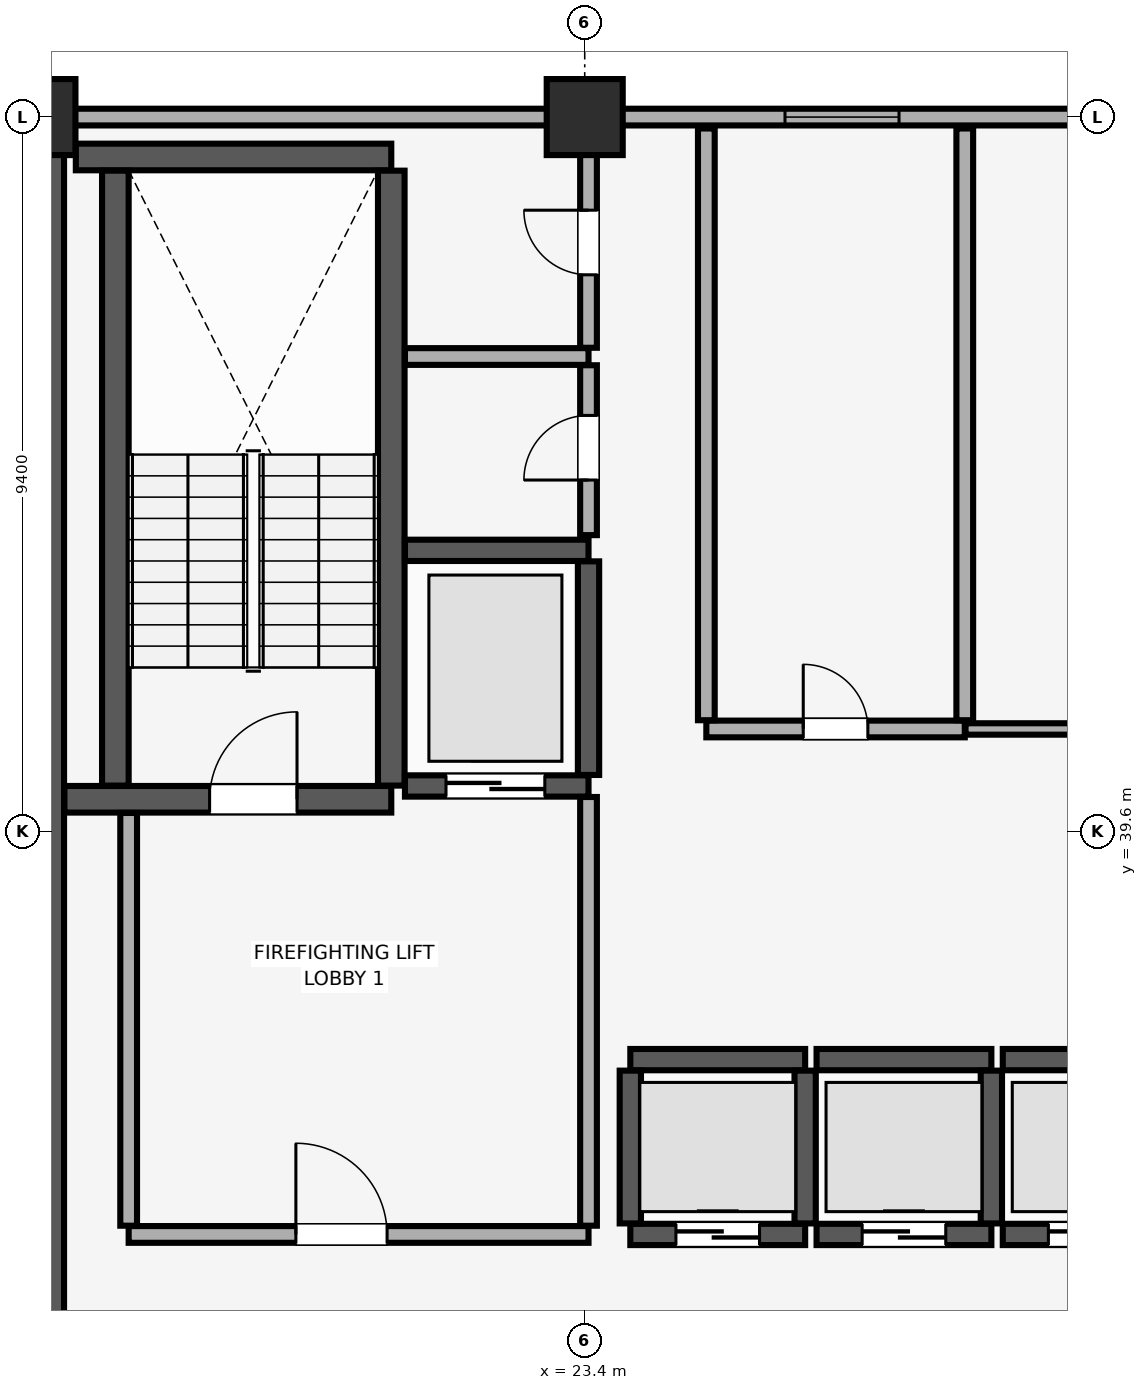
"""IFC4 building model, lengths in metres.
Left out: names, types, materials, properties, quantities, classifications, styles, units other than length and angle.
Written with IfcOpenShell. Run it as: python <this file> out.ifc"""

import sys

from ifc_helpers import new_model, si_unit, direction, frame, frame_2d, origin, origin_2d, place, context, subcontext, project, spatial, rectangle, extrude, element, fill, save


model = new_model("IFC4")
c1 = context("Model", 3, precision=1e-05, world=origin(), true_north=direction((0.0, 1.0)))
c2 = subcontext(c1, "Body", "Model", "MODEL_VIEW")
j1 = project(units=[si_unit("LENGTHUNIT", "METRE"), si_unit("PLANEANGLEUNIT", "RADIAN")], contexts=[c1])
p1 = place(None, origin())
s1 = spatial("IfcSite", under=j1, at=p1, CompositionType="ELEMENT")
p2 = place(p1, origin())
s2 = spatial("IfcBuilding", under=s1, at=p2, CompositionType="ELEMENT")
p3 = place(p2, frame((0.0, 0.0, 276.55)))
s3 = spatial("IfcBuildingStorey", under=s2, at=p3, CompositionType="ELEMENT", Elevation=276.55)
for number, where, z_axis, x_axis in (
    (1, (16.2, 49.0, 0.0), (0.0, 0.0, 1.0), (1.0, 0.0, 0.0)),
    (2, (23.4, 49.0, 0.0), (0.0, 0.0, 1.0), (1.0, 0.0, 0.0)),
):
    element("IfcColumn", number, at=place(p3, frame(where, z_axis=z_axis, x_axis=x_axis)), inside=s3, PredefinedType="COLUMN", context=c2, shape_type="SweptSolid", body=[
        extrude(rectangle(XDim=1.0, YDim=1.0, at=origin_2d()), origin(), (0.0, 0.0, 1.0), 3.6),
    ])
p4 = place(p3, frame((74.2, 49.0, 0.0), z_axis=(0.0, 0.0, 1.0), x_axis=(-1.0, 0.0, 0.0)))
e3 = element("IfcWall", 3, at=p4, inside=s3, PredefinedType="SOLIDWALL", context=c2, shape_type="SweptSolid", body=[
    extrude(rectangle(XDim=64.4, YDim=0.22, at=frame_2d((32.2, 0.0))), origin(), (0.0, 0.0, 1.0), 2.8),
])
p5 = place(p4, frame((59.815, 0.0, 0.85)))
e4 = element("IfcOpeningElement", 4, at=p5, cuts=e3, PredefinedType="OPENING", context=c2, shape_type="SweptSolid", body=[
    extrude(rectangle(XDim=3.0, YDim=1.5, at=frame_2d((1.5, 0.75))), frame((0.0, 0.12, 0.0), z_axis=(0.0, -1.0, 0.0), x_axis=(1.0, 0.0, 0.0)), (0.0, 0.0, 1.0), 0.24),
])
p6 = place(p4, frame((1.585, 0.0, 0.85)))
e5 = element("IfcOpeningElement", 5, at=p6, cuts=e3, PredefinedType="OPENING", context=c2, shape_type="SweptSolid", body=[
    extrude(rectangle(XDim=3.0, YDim=1.5, at=frame_2d((1.5, 0.75))), frame((0.0, 0.12, 0.0), z_axis=(0.0, -1.0, 0.0), x_axis=(1.0, 0.0, 0.0)), (0.0, 0.0, 1.0), 0.24),
])
p7 = place(p4, frame((46.665, 0.0, 0.9)))
e6 = element("IfcOpeningElement", 6, at=p7, cuts=e3, PredefinedType="OPENING", context=c2, shape_type="SweptSolid", body=[
    extrude(rectangle(XDim=1.5, YDim=1.4, at=frame_2d((0.75, 0.7))), frame((0.0, 0.12, 0.0), z_axis=(0.0, -1.0, 0.0), x_axis=(1.0, 0.0, 0.0)), (0.0, 0.0, 1.0), 0.24),
])
p8 = place(p4, frame((38.85, 0.0, 0.9)))
e7 = element("IfcOpeningElement", 7, at=p8, cuts=e3, PredefinedType="OPENING", context=c2, shape_type="SweptSolid", body=[
    extrude(rectangle(XDim=3.6, YDim=1.5, at=frame_2d((1.8, 0.75))), frame((0.0, 0.12, 0.0), z_axis=(0.0, -1.0, 0.0), x_axis=(1.0, 0.0, 0.0)), (0.0, 0.0, 1.0), 0.24),
])
p9 = place(p4, frame((25.45, 0.0, 0.9)))
e8 = element("IfcOpeningElement", 8, at=p9, cuts=e3, PredefinedType="OPENING", context=c2, shape_type="SweptSolid", body=[
    extrude(rectangle(XDim=1.5, YDim=1.4, at=frame_2d((0.75, 0.7))), frame((0.0, 0.12, 0.0), z_axis=(0.0, -1.0, 0.0), x_axis=(1.0, 0.0, 0.0)), (0.0, 0.0, 1.0), 0.24),
])
p10 = place(p4, frame((21.8, 0.0, 0.9)))
e9 = element("IfcOpeningElement", 9, at=p10, cuts=e3, PredefinedType="OPENING", context=c2, shape_type="SweptSolid", body=[
    extrude(rectangle(XDim=2.4, YDim=1.5, at=frame_2d((1.2, 0.75))), frame((0.0, 0.12, 0.0), z_axis=(0.0, -1.0, 0.0), x_axis=(1.0, 0.0, 0.0)), (0.0, 0.0, 1.0), 0.24),
])
p11 = place(p4, frame((17.435, 0.0, 0.9)))
e10 = element("IfcOpeningElement", 10, at=p11, cuts=e3, PredefinedType="OPENING", context=c2, shape_type="SweptSolid", body=[
    extrude(rectangle(XDim=2.4, YDim=1.5, at=frame_2d((1.2, 0.75))), frame((0.0, 0.12, 0.0), z_axis=(0.0, -1.0, 0.0), x_axis=(1.0, 0.0, 0.0)), (0.0, 0.0, 1.0), 0.24),
])
p12 = place(p3, frame((16.2, 29.4, 0.0), z_axis=(0.0, 0.0, 1.0), x_axis=(0.0, 1.0, 0.0)))
e11 = element("IfcWall", 11, at=p12, inside=s3, PredefinedType="SHEAR", context=c2, shape_type="SweptSolid", body=[
    extrude(rectangle(XDim=19.2, YDim=0.7, at=frame_2d((9.6, 0.0))), origin(), (0.0, 0.0, 1.0), 3.6),
])
p13 = place(p3, frame((16.555, 40.025, 0.0), z_axis=(0.0, 0.0, 1.0), x_axis=(1.0, 0.0, 0.0)))
e12 = element("IfcWall", 12, at=p13, inside=s3, PredefinedType="SHEAR", context=c2, shape_type="SweptSolid", body=[
    extrude(rectangle(XDim=4.3, YDim=0.35, at=frame_2d((2.15, 0.0))), origin(), (0.0, 0.0, 1.0), 3.6),
])
p14 = place(p13, frame((1.91, 0.0, 0.0)))
e13 = element("IfcOpeningElement", 13, at=p14, cuts=e12, PredefinedType="OPENING", context=c2, shape_type="SweptSolid", body=[
    extrude(rectangle(XDim=1.15, YDim=2.15, at=frame_2d((0.575, 1.075))), frame((0.0, 0.185, 0.0), z_axis=(0.0, -1.0, 0.0), x_axis=(1.0, 0.0, 0.0)), (0.0, 0.0, 1.0), 0.37),
])
p15 = place(p3, frame((16.705, 48.475, 0.0), z_axis=(0.0, 0.0, 1.0), x_axis=(1.0, 0.0, 0.0)))
e14 = element("IfcWall", 14, at=p15, inside=s3, PredefinedType="SHEAR", context=c2, shape_type="SweptSolid", body=[
    extrude(rectangle(XDim=4.15, YDim=0.35, at=frame_2d((2.075, 0.0))), origin(), (0.0, 0.0, 1.0), 3.6),
])
for number, where, z_axis, x_axis in (
    (15, (17.225, 40.205, 0.0), (0.0, 0.0, 1.0), (0.0, 1.0, 0.0)),
    (16, (20.855, 40.205, 0.0), (0.0, 0.0, 1.0), (0.0, 1.0, 0.0)),
):
    element("IfcWall", number, at=place(p3, frame(where, z_axis=z_axis, x_axis=x_axis)), inside=s3, PredefinedType="SHEAR", context=c2, shape_type="SweptSolid", body=[
        extrude(rectangle(XDim=8.09, YDim=0.35, at=frame_2d((4.045, 0.0))), origin(), (0.0, 0.0, 1.0), 3.6),
    ])
p16 = place(p3, frame((24.0, 34.3, 0.0), z_axis=(0.0, 0.0, 1.0), x_axis=(1.0, 0.0, 0.0)))
e17 = element("IfcWall", 17, at=p16, inside=s3, PredefinedType="SHEAR", context=c2, shape_type="SweptSolid", body=[
    extrude(rectangle(XDim=2.3, YDim=0.28, at=frame_2d((1.15, 0.0))), origin(), (0.0, 0.0, 1.0), 3.6),
])
p17 = place(p16, frame((0.6, 0.0, 0.0)))
e18 = element("IfcOpeningElement", 18, at=p17, cuts=e17, PredefinedType="OPENING", context=c2, shape_type="SweptSolid", body=[
    extrude(rectangle(XDim=1.1, YDim=2.2, at=frame_2d((0.55, 1.1))), frame((0.0, 0.15, 0.0), z_axis=(0.0, -1.0, 0.0), x_axis=(1.0, 0.0, 0.0)), (0.0, 0.0, 1.0), 0.3),
])
p18 = place(p3, frame((24.0, 36.6, 0.0), z_axis=(0.0, 0.0, 1.0), x_axis=(1.0, 0.0, 0.0)))
e19 = element("IfcWall", 19, at=p18, inside=s3, PredefinedType="SHEAR", context=c2, shape_type="SweptSolid", body=[
    extrude(rectangle(XDim=2.3, YDim=0.28, at=frame_2d((1.15, 0.0))), origin(), (0.0, 0.0, 1.0), 3.6),
])
for number, where, z_axis, x_axis in (
    (20, (24.0, 34.445, 0.0), (0.0, 0.0, 1.0), (0.0, 1.0, 0.0)),
    (21, (26.3, 34.445, 0.0), (0.0, 0.0, 1.0), (0.0, 1.0, 0.0)),
):
    element("IfcWall", number, at=place(p3, frame(where, z_axis=z_axis, x_axis=x_axis)), inside=s3, PredefinedType="SHEAR", context=c2, shape_type="SweptSolid", body=[
        extrude(rectangle(XDim=2.01, YDim=0.28, at=frame_2d((1.005, 0.0))), origin(), (0.0, 0.0, 1.0), 3.6),
    ])
p19 = place(p3, frame((26.45, 34.3, 0.0), z_axis=(0.0, 0.0, 1.0), x_axis=(1.0, 0.0, 0.0)))
e22 = element("IfcWall", 22, at=p19, inside=s3, PredefinedType="SHEAR", context=c2, shape_type="SweptSolid", body=[
    extrude(rectangle(XDim=2.3, YDim=0.28, at=frame_2d((1.15, 0.0))), origin(), (0.0, 0.0, 1.0), 3.6),
])
p20 = place(p19, frame((0.6, 0.0, 0.0)))
e23 = element("IfcOpeningElement", 23, at=p20, cuts=e22, PredefinedType="OPENING", context=c2, shape_type="SweptSolid", body=[
    extrude(rectangle(XDim=1.1, YDim=2.2, at=frame_2d((0.55, 1.1))), frame((0.0, 0.15, 0.0), z_axis=(0.0, -1.0, 0.0), x_axis=(1.0, 0.0, 0.0)), (0.0, 0.0, 1.0), 0.3),
])
p21 = place(p3, frame((26.45, 36.6, 0.0), z_axis=(0.0, 0.0, 1.0), x_axis=(1.0, 0.0, 0.0)))
e24 = element("IfcWall", 24, at=p21, inside=s3, PredefinedType="SHEAR", context=c2, shape_type="SweptSolid", body=[
    extrude(rectangle(XDim=2.3, YDim=0.28, at=frame_2d((1.15, 0.0))), origin(), (0.0, 0.0, 1.0), 3.6),
])
p22 = place(p3, frame((28.75, 34.445, 0.0), z_axis=(0.0, 0.0, 1.0), x_axis=(0.0, 1.0, 0.0)))
e25 = element("IfcWall", 25, at=p22, inside=s3, PredefinedType="SHEAR", context=c2, shape_type="SweptSolid", body=[
    extrude(rectangle(XDim=2.01, YDim=0.28, at=frame_2d((1.005, 0.0))), origin(), (0.0, 0.0, 1.0), 3.6),
])
p23 = place(p3, frame((28.9, 34.3, 0.0), z_axis=(0.0, 0.0, 1.0), x_axis=(1.0, 0.0, 0.0)))
e26 = element("IfcWall", 26, at=p23, inside=s3, PredefinedType="SHEAR", context=c2, shape_type="SweptSolid", body=[
    extrude(rectangle(XDim=2.3, YDim=0.28, at=frame_2d((1.15, 0.0))), origin(), (0.0, 0.0, 1.0), 3.6),
])
p24 = place(p23, frame((0.6, 0.0, 0.0)))
e27 = element("IfcOpeningElement", 27, at=p24, cuts=e26, PredefinedType="OPENING", context=c2, shape_type="SweptSolid", body=[
    extrude(rectangle(XDim=1.1, YDim=2.2, at=frame_2d((0.55, 1.1))), frame((0.0, 0.15, 0.0), z_axis=(0.0, -1.0, 0.0), x_axis=(1.0, 0.0, 0.0)), (0.0, 0.0, 1.0), 0.3),
])
p25 = place(p3, frame((28.9, 36.6, 0.0), z_axis=(0.0, 0.0, 1.0), x_axis=(1.0, 0.0, 0.0)))
e28 = element("IfcWall", 28, at=p25, inside=s3, PredefinedType="SHEAR", context=c2, shape_type="SweptSolid", body=[
    extrude(rectangle(XDim=2.3, YDim=0.28, at=frame_2d((1.15, 0.0))), origin(), (0.0, 0.0, 1.0), 3.6),
])
p26 = place(p3, frame((21.035, 40.2, 0.0), z_axis=(0.0, 0.0, 1.0), x_axis=(1.0, 0.0, 0.0)))
e29 = element("IfcWall", 29, at=p26, inside=s3, PredefinedType="SHEAR", context=c2, shape_type="SweptSolid", body=[
    extrude(rectangle(XDim=2.415, YDim=0.28, at=frame_2d((1.208, 0.0))), origin(), (0.0, 0.0, 1.0), 3.6),
])
p27 = place(p26, frame((0.54, 0.0, 0.0)))
e30 = element("IfcOpeningElement", 30, at=p27, cuts=e29, PredefinedType="OPENING", context=c2, shape_type="SweptSolid", body=[
    extrude(rectangle(XDim=1.3, YDim=2.3, at=frame_2d((0.65, 1.15))), frame((0.0, 0.15, 0.0), z_axis=(0.0, -1.0, 0.0), x_axis=(1.0, 0.0, 0.0)), (0.0, 0.0, 1.0), 0.3),
])
p28 = place(p3, frame((21.035, 43.3, 0.0), z_axis=(0.0, 0.0, 1.0), x_axis=(1.0, 0.0, 0.0)))
e31 = element("IfcWall", 31, at=p28, inside=s3, PredefinedType="SHEAR", context=c2, shape_type="SweptSolid", body=[
    extrude(rectangle(XDim=2.415, YDim=0.28, at=frame_2d((1.208, 0.0))), origin(), (0.0, 0.0, 1.0), 3.6),
])
p29 = place(p3, frame((23.45, 40.345, 0.0), z_axis=(0.0, 0.0, 1.0), x_axis=(0.0, 1.0, 0.0)))
e32 = element("IfcWall", 32, at=p29, inside=s3, PredefinedType="SHEAR", context=c2, shape_type="SweptSolid", body=[
    extrude(rectangle(XDim=2.81, YDim=0.28, at=frame_2d((1.405, 0.0))), origin(), (0.0, 0.0, 1.0), 3.6),
])
p30 = place(p3, frame((17.4, 34.3, 0.0), z_axis=(0.0, 0.0, 1.0), x_axis=(1.0, 0.0, 0.0)))
e33 = element("IfcWall", 33, at=p30, inside=s3, PredefinedType="PARTITIONING", context=c2, shape_type="SweptSolid", body=[
    extrude(rectangle(XDim=6.05, YDim=0.22, at=frame_2d((3.025, 0.0))), origin(), (0.0, 0.0, 1.0), 3.6),
])
p31 = place(p30, frame((2.2, 0.0, 0.0)))
e34 = element("IfcOpeningElement", 34, at=p31, cuts=e33, PredefinedType="OPENING", context=c2, shape_type="SweptSolid", body=[
    extrude(rectangle(XDim=1.2, YDim=2.15, at=frame_2d((0.6, 1.075))), frame((0.0, 0.12, 0.0), z_axis=(0.0, -1.0, 0.0), x_axis=(1.0, 0.0, 0.0)), (0.0, 0.0, 1.0), 0.24),
])
p32 = place(p3, frame((17.4, 34.415, 0.0), z_axis=(0.0, 0.0, 1.0), x_axis=(0.0, 1.0, 0.0)))
e35 = element("IfcWall", 35, at=p32, inside=s3, PredefinedType="PARTITIONING", context=c2, shape_type="SweptSolid", body=[
    extrude(rectangle(XDim=5.43, YDim=0.22, at=frame_2d((2.715, 0.0))), origin(), (0.0, 0.0, 1.0), 3.6),
])
p33 = place(p3, frame((23.45, 34.415, 0.0), z_axis=(0.0, 0.0, 1.0), x_axis=(0.0, 1.0, 0.0)))
e36 = element("IfcWall", 36, at=p33, inside=s3, PredefinedType="PARTITIONING", context=c2, shape_type="SweptSolid", body=[
    extrude(rectangle(XDim=5.64, YDim=0.22, at=frame_2d((2.82, 0.0))), origin(), (0.0, 0.0, 1.0), 3.6),
])
p34 = place(p3, frame((21.035, 45.85, 0.0), z_axis=(0.0, 0.0, 1.0), x_axis=(1.0, 0.0, 0.0)))
e37 = element("IfcWall", 37, at=p34, inside=s3, PredefinedType="PARTITIONING", context=c2, shape_type="SweptSolid", body=[
    extrude(rectangle(XDim=2.415, YDim=0.22, at=frame_2d((1.208, 0.0))), origin(), (0.0, 0.0, 1.0), 3.6),
])
p35 = place(p3, frame((23.45, 43.5, 0.0), z_axis=(0.0, 0.0, 1.0), x_axis=(0.0, 1.0, 0.0)))
e38 = element("IfcWall", 38, at=p35, inside=s3, PredefinedType="PARTITIONING", context=c2, shape_type="SweptSolid", body=[
    extrude(rectangle(XDim=2.235, YDim=0.22, at=frame_2d((1.118, 0.0))), origin(), (0.0, 0.0, 1.0), 3.6),
])
p36 = place(p35, frame((0.725, 0.0, 0.0)))
e39 = element("IfcOpeningElement", 39, at=p36, cuts=e38, PredefinedType="OPENING", context=c2, shape_type="SweptSolid", body=[
    extrude(rectangle(XDim=0.85, YDim=2.1, at=frame_2d((0.425, 1.05))), frame((0.0, 0.12, 0.0), z_axis=(0.0, -1.0, 0.0), x_axis=(1.0, 0.0, 0.0)), (0.0, 0.0, 1.0), 0.24),
])
p37 = place(p3, frame((23.45, 45.965, 0.0), z_axis=(0.0, 0.0, 1.0), x_axis=(0.0, 1.0, 0.0)))
e40 = element("IfcWall", 40, at=p37, inside=s3, PredefinedType="PARTITIONING", context=c2, shape_type="SweptSolid", body=[
    extrude(rectangle(XDim=2.885, YDim=0.22, at=frame_2d((1.442, 0.0))), origin(), (0.0, 0.0, 1.0), 3.6),
])
p38 = place(p37, frame((0.96, 0.0, 0.0)))
e41 = element("IfcOpeningElement", 41, at=p38, cuts=e40, PredefinedType="OPENING", context=c2, shape_type="SweptSolid", body=[
    extrude(rectangle(XDim=0.85, YDim=2.1, at=frame_2d((0.425, 1.05))), frame((0.0, 0.12, 0.0), z_axis=(0.0, -1.0, 0.0), x_axis=(1.0, 0.0, 0.0)), (0.0, 0.0, 1.0), 0.24),
])
p39 = place(p3, frame((25.0, 40.95, 0.0), z_axis=(0.0, 0.0, 1.0), x_axis=(1.0, 0.0, 0.0)))
e42 = element("IfcWall", 42, at=p39, inside=s3, PredefinedType="PARTITIONING", context=c2, shape_type="SweptSolid", body=[
    extrude(rectangle(XDim=3.4, YDim=0.22, at=frame_2d((1.7, 0.0))), origin(), (0.0, 0.0, 1.0), 3.6),
])
p40 = place(p39, frame((1.275, 0.0, 0.0)))
e43 = element("IfcOpeningElement", 43, at=p40, cuts=e42, PredefinedType="OPENING", context=c2, shape_type="SweptSolid", body=[
    extrude(rectangle(XDim=0.85, YDim=2.1, at=frame_2d((0.425, 1.05))), frame((0.0, 0.12, 0.0), z_axis=(0.0, -1.0, 0.0), x_axis=(1.0, 0.0, 0.0)), (0.0, 0.0, 1.0), 0.24),
])
for number, where, z_axis, x_axis in (
    (44, (25.0, 41.065, 0.0), (0.0, 0.0, 1.0), (0.0, 1.0, 0.0)),
    (45, (28.4, 41.065, 0.0), (0.0, 0.0, 1.0), (0.0, 1.0, 0.0)),
):
    element("IfcWall", number, at=place(p3, frame(where, z_axis=z_axis, x_axis=x_axis)), inside=s3, PredefinedType="PARTITIONING", context=c2, shape_type="SweptSolid", body=[
        extrude(rectangle(XDim=7.785, YDim=0.22, at=frame_2d((3.893, 0.0))), origin(), (0.0, 0.0, 1.0), 3.6),
    ])
p41 = place(p3, frame((28.41, 40.95, 0.0), z_axis=(0.0, 0.0, 1.0), x_axis=(1.0, 0.0, 0.0)))
e46 = element("IfcWall", 46, at=p41, inside=s3, PredefinedType="PARTITIONING", context=c2, shape_type="SweptSolid", body=[
    extrude(rectangle(XDim=7.69, YDim=0.15, at=frame_2d((3.845, 0.0))), origin(), (0.0, 0.0, 1.0), 3.6),
])
p42 = place(p41, frame((3.415, 0.0, 0.0)))
e47 = element("IfcOpeningElement", 47, at=p42, cuts=e46, PredefinedType="OPENING", context=c2, shape_type="SweptSolid", body=[
    extrude(rectangle(XDim=0.85, YDim=2.1, at=frame_2d((0.425, 1.05))), frame((0.0, 0.085, 0.0), z_axis=(0.0, -1.0, 0.0), x_axis=(1.0, 0.0, 0.0)), (0.0, 0.0, 1.0), 0.17),
])
p43 = place(p7, origin())
e48 = element("IfcWindow", 48, at=p43, inside=s3, PartitioningType="SINGLE_PANEL", PredefinedType="WINDOW", context=c2, shape_type="SweptSolid", body=[
    extrude(rectangle(XDim=1.5, YDim=1.4, at=frame_2d((0.75, 0.7))), frame((0.0, 0.03, 0.0), z_axis=(0.0, -1.0, 0.0), x_axis=(1.0, 0.0, 0.0)), (0.0, 0.0, 1.0), 0.06),
])
fill(e6, e48)
p44 = place(p14, origin())
e49 = element("IfcDoor", 49, at=p44, inside=s3, OperationType="SINGLE_SWING_RIGHT", PredefinedType="DOOR", context=c2, shape_type="SweptSolid", body=[
    extrude(rectangle(XDim=1.15, YDim=2.15, at=frame_2d((0.575, 1.075))), frame((0.0, 0.025, 0.0), z_axis=(0.0, -1.0, 0.0), x_axis=(1.0, 0.0, 0.0)), (0.0, 0.0, 1.0), 0.05),
])
fill(e13, e49)
p45 = place(p17, origin())
e50 = element("IfcDoor", 50, at=p45, inside=s3, OperationType="DOUBLE_DOOR_SLIDING", PredefinedType="DOOR", context=c2, shape_type="SweptSolid", body=[
    extrude(rectangle(XDim=1.1, YDim=2.2, at=frame_2d((0.55, 1.1))), frame((0.0, 0.025, 0.0), z_axis=(0.0, -1.0, 0.0), x_axis=(1.0, 0.0, 0.0)), (0.0, 0.0, 1.0), 0.05),
])
fill(e18, e50)
p46 = place(p20, origin())
e51 = element("IfcDoor", 51, at=p46, inside=s3, OperationType="DOUBLE_DOOR_SLIDING", PredefinedType="DOOR", context=c2, shape_type="SweptSolid", body=[
    extrude(rectangle(XDim=1.1, YDim=2.2, at=frame_2d((0.55, 1.1))), frame((0.0, 0.025, 0.0), z_axis=(0.0, -1.0, 0.0), x_axis=(1.0, 0.0, 0.0)), (0.0, 0.0, 1.0), 0.05),
])
fill(e23, e51)
p47 = place(p24, origin())
e52 = element("IfcDoor", 52, at=p47, inside=s3, OperationType="DOUBLE_DOOR_SLIDING", PredefinedType="DOOR", context=c2, shape_type="SweptSolid", body=[
    extrude(rectangle(XDim=1.1, YDim=2.2, at=frame_2d((0.55, 1.1))), frame((0.0, 0.025, 0.0), z_axis=(0.0, -1.0, 0.0), x_axis=(1.0, 0.0, 0.0)), (0.0, 0.0, 1.0), 0.05),
])
fill(e27, e52)
p48 = place(p27, origin())
e53 = element("IfcDoor", 53, at=p48, inside=s3, OperationType="DOUBLE_DOOR_SLIDING", PredefinedType="DOOR", context=c2, shape_type="SweptSolid", body=[
    extrude(rectangle(XDim=1.3, YDim=2.3, at=frame_2d((0.65, 1.15))), frame((0.0, 0.025, 0.0), z_axis=(0.0, -1.0, 0.0), x_axis=(1.0, 0.0, 0.0)), (0.0, 0.0, 1.0), 0.05),
])
fill(e30, e53)
p49 = place(p31, origin())
e54 = element("IfcDoor", 54, at=p49, inside=s3, OperationType="SINGLE_SWING_LEFT", PredefinedType="DOOR", context=c2, shape_type="SweptSolid", body=[
    extrude(rectangle(XDim=1.2, YDim=2.15, at=frame_2d((0.6, 1.075))), frame((0.0, 0.025, 0.0), z_axis=(0.0, -1.0, 0.0), x_axis=(1.0, 0.0, 0.0)), (0.0, 0.0, 1.0), 0.05),
])
fill(e34, e54)
p50 = place(p36, origin())
e55 = element("IfcDoor", 55, at=p50, inside=s3, OperationType="SINGLE_SWING_LEFT", PredefinedType="DOOR", context=c2, shape_type="SweptSolid", body=[
    extrude(rectangle(XDim=0.85, YDim=2.1, at=frame_2d((0.425, 1.05))), frame((0.0, 0.025, 0.0), z_axis=(0.0, -1.0, 0.0), x_axis=(1.0, 0.0, 0.0)), (0.0, 0.0, 1.0), 0.05),
])
fill(e39, e55)
p51 = place(p38, origin())
e56 = element("IfcDoor", 56, at=p51, inside=s3, OperationType="SINGLE_SWING_RIGHT", PredefinedType="DOOR", context=c2, shape_type="SweptSolid", body=[
    extrude(rectangle(XDim=0.85, YDim=2.1, at=frame_2d((0.425, 1.05))), frame((0.0, 0.025, 0.0), z_axis=(0.0, -1.0, 0.0), x_axis=(1.0, 0.0, 0.0)), (0.0, 0.0, 1.0), 0.05),
])
fill(e41, e56)
p52 = place(p40, origin())
e57 = element("IfcDoor", 57, at=p52, inside=s3, OperationType="SINGLE_SWING_LEFT", PredefinedType="DOOR", context=c2, shape_type="SweptSolid", body=[
    extrude(rectangle(XDim=0.85, YDim=2.1, at=frame_2d((0.425, 1.05))), frame((0.0, 0.025, 0.0), z_axis=(0.0, -1.0, 0.0), x_axis=(1.0, 0.0, 0.0)), (0.0, 0.0, 1.0), 0.05),
])
fill(e43, e57)
save(model, sys.argv[1])
